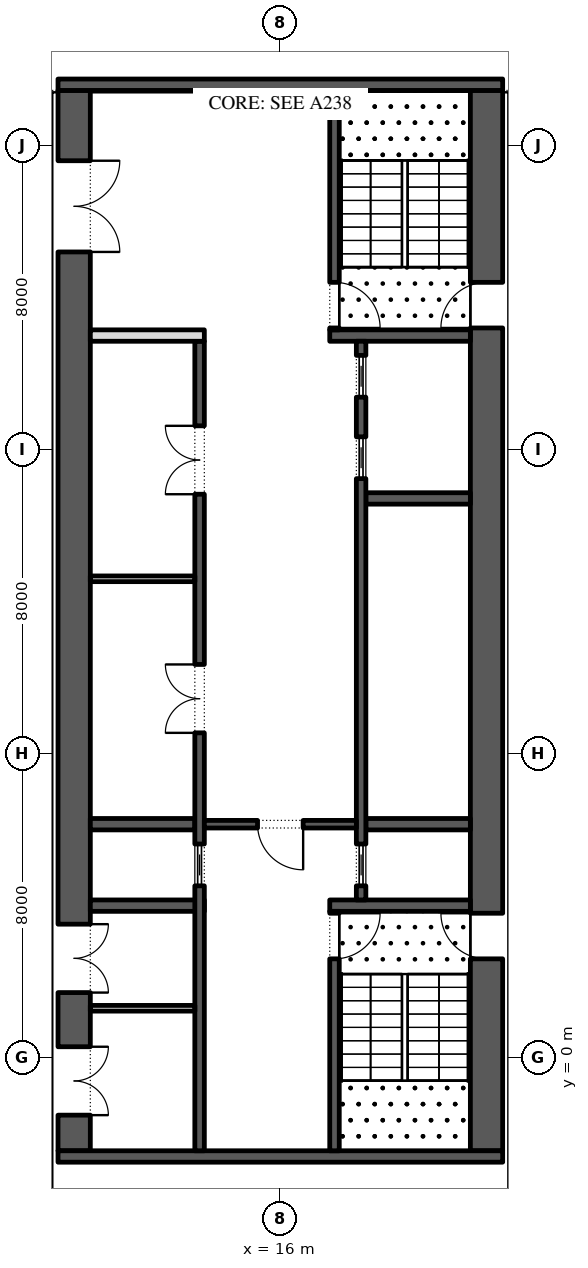
"""IFC4 building model, lengths in metres.
Left out: names, types, materials, properties, quantities, classifications, styles, units other than length and angle.
Written with IfcOpenShell. Run it as: python <this file> out.ifc"""

import sys

from ifc_helpers import new_model, si_unit, direction, frame, frame_2d, origin, place, context, subcontext, project, spatial, rectangle, extrude, element, fill, save


model = new_model("IFC4")
c1 = context("Model", 3, precision=1e-05, world=origin(), true_north=direction((0.0, 1.0)))
c2 = subcontext(c1, "Body", "Model", "MODEL_VIEW")
j1 = project(units=[si_unit("LENGTHUNIT", "METRE"), si_unit("PLANEANGLEUNIT", "RADIAN")], contexts=[c1])
p1 = place(None, origin())
s1 = spatial("IfcSite", under=j1, at=p1, CompositionType="ELEMENT")
p2 = place(p1, origin())
s2 = spatial("IfcBuilding", under=s1, at=p2, CompositionType="ELEMENT")
p3 = place(p2, frame((0.0, 0.0, 160.2)))
s3 = spatial("IfcBuildingStorey", under=s2, at=p3, CompositionType="ELEMENT", Elevation=160.2)
p4 = place(p3, frame((21.425, -2.45, 0.0), z_axis=(0.0, 0.0, 1.0), x_axis=(0.0, 1.0, 0.0)))
e1 = element("IfcWall", 1, at=p4, inside=s3, PredefinedType="SHEAR", context=c2, shape_type="SweptSolid", body=[
    extrude(rectangle(XDim=27.9, YDim=0.85, at=frame_2d((13.95, 0.0))), origin(), (0.0, 0.0, 1.0), 4.95),
])
p5 = place(p4, frame((5.05, 0.0, 0.0)))
e2 = element("IfcOpeningElement", 2, at=p5, cuts=e1, PredefinedType="OPENING", context=c2, shape_type="SweptSolid", body=[
    extrude(rectangle(XDim=1.2, YDim=2.1, at=frame_2d((0.6, 1.05))), frame((0.0, 0.435, 0.0), z_axis=(0.0, -1.0, 0.0), x_axis=(1.0, 0.0, 0.0)), (0.0, 0.0, 1.0), 0.87),
])
p6 = place(p4, frame((21.65, 0.0, 0.0)))
e3 = element("IfcOpeningElement", 3, at=p6, cuts=e1, PredefinedType="OPENING", context=c2, shape_type="SweptSolid", body=[
    extrude(rectangle(XDim=1.2, YDim=2.1, at=frame_2d((0.6, 1.05))), frame((0.0, 0.435, 0.0), z_axis=(0.0, -1.0, 0.0), x_axis=(1.0, 0.0, 0.0)), (0.0, 0.0, 1.0), 0.87),
])
p7 = place(p3, frame((10.575, -2.45, 0.0), z_axis=(0.0, 0.0, 1.0), x_axis=(0.0, 1.0, 0.0)))
e4 = element("IfcWall", 4, at=p7, inside=s3, PredefinedType="SHEAR", context=c2, shape_type="SweptSolid", body=[
    extrude(rectangle(XDim=27.9, YDim=0.85, at=frame_2d((13.95, 0.0))), origin(), (0.0, 0.0, 1.0), 4.95),
])
p8 = place(p7, frame((23.65, 0.0, 0.0)))
e5 = element("IfcOpeningElement", 5, at=p8, cuts=e4, PredefinedType="OPENING", context=c2, shape_type="SweptSolid", body=[
    extrude(rectangle(XDim=2.4, YDim=2.1, at=frame_2d((1.2, 1.05))), frame((0.0, 0.435, 0.0), z_axis=(0.0, -1.0, 0.0), x_axis=(1.0, 0.0, 0.0)), (0.0, 0.0, 1.0), 0.87),
])
p9 = place(p7, frame((0.938, 0.0, 0.0)))
e6 = element("IfcOpeningElement", 6, at=p9, cuts=e4, PredefinedType="OPENING", context=c2, shape_type="SweptSolid", body=[
    extrude(rectangle(XDim=1.8, YDim=2.4, at=frame_2d((0.9, 1.2))), frame((0.0, 0.435, 0.0), z_axis=(0.0, -1.0, 0.0), x_axis=(1.0, 0.0, 0.0)), (0.0, 0.0, 1.0), 0.87),
])
p10 = place(p7, frame((4.163, 0.0, 0.0)))
e7 = element("IfcOpeningElement", 7, at=p10, cuts=e4, PredefinedType="OPENING", context=c2, shape_type="SweptSolid", body=[
    extrude(rectangle(XDim=1.8, YDim=2.4, at=frame_2d((0.9, 1.2))), frame((0.0, 0.435, 0.0), z_axis=(0.0, -1.0, 0.0), x_axis=(1.0, 0.0, 0.0)), (0.0, 0.0, 1.0), 0.87),
])
for number, where, z_axis, x_axis in (
    (8, (10.15, -2.6, 0.0), (0.0, 0.0, 1.0), (1.0, 0.0, 0.0)),
    (9, (10.15, 25.6, 0.0), (0.0, 0.0, 1.0), (1.0, 0.0, 0.0)),
):
    element("IfcWall", number, at=place(p3, frame(where, z_axis=z_axis, x_axis=x_axis)), inside=s3, PredefinedType="SHEAR", context=c2, shape_type="SweptSolid", body=[
        extrude(rectangle(XDim=11.7, YDim=0.3, at=frame_2d((5.85, 0.0))), origin(), (0.0, 0.0, 1.0), 4.95),
    ])
p11 = place(p3, frame((17.3, 4.0, 0.0), z_axis=(0.0, 0.0, 1.0), x_axis=(1.0, 0.0, 0.0)))
e10 = element("IfcWall", 10, at=p11, inside=s3, PredefinedType="SHEAR", context=c2, shape_type="SweptSolid", body=[
    extrude(rectangle(XDim=3.7, YDim=0.3, at=frame_2d((1.85, 0.0))), origin(), (0.0, 0.0, 1.0), 4.95),
])
p12 = place(p3, frame((17.425, -2.45, 0.0), z_axis=(0.0, 0.0, 1.0), x_axis=(0.0, 1.0, 0.0)))
e11 = element("IfcWall", 11, at=p12, inside=s3, PredefinedType="SHEAR", context=c2, shape_type="SweptSolid", body=[
    extrude(rectangle(XDim=6.3, YDim=0.25, at=frame_2d((3.15, 0.0))), origin(), (0.0, 0.0, 1.0), 4.95),
])
p13 = place(p12, frame((5.05, 0.0, 0.0)))
e12 = element("IfcOpeningElement", 12, at=p13, cuts=e11, PredefinedType="OPENING", context=c2, shape_type="SweptSolid", body=[
    extrude(rectangle(XDim=1.2, YDim=2.1, at=frame_2d((0.6, 1.05))), frame((0.0, 0.135, 0.0), z_axis=(0.0, -1.0, 0.0), x_axis=(1.0, 0.0, 0.0)), (0.0, 0.0, 1.0), 0.27),
])
p14 = place(p3, frame((17.3, 19.0, 0.0), z_axis=(0.0, 0.0, 1.0), x_axis=(1.0, 0.0, 0.0)))
e13 = element("IfcWall", 13, at=p14, inside=s3, PredefinedType="SHEAR", context=c2, shape_type="SweptSolid", body=[
    extrude(rectangle(XDim=3.7, YDim=0.3, at=frame_2d((1.85, 0.0))), origin(), (0.0, 0.0, 1.0), 4.95),
])
p15 = place(p3, frame((17.425, 19.15, 0.0), z_axis=(0.0, 0.0, 1.0), x_axis=(0.0, 1.0, 0.0)))
e14 = element("IfcWall", 14, at=p15, inside=s3, PredefinedType="SHEAR", context=c2, shape_type="SweptSolid", body=[
    extrude(rectangle(XDim=6.3, YDim=0.25, at=frame_2d((3.15, 0.0))), origin(), (0.0, 0.0, 1.0), 4.95),
])
p16 = place(p15, frame((0.05, 0.0, 0.0)))
e15 = element("IfcOpeningElement", 15, at=p16, cuts=e14, PredefinedType="OPENING", context=c2, shape_type="SweptSolid", body=[
    extrude(rectangle(XDim=1.2, YDim=2.1, at=frame_2d((0.6, 1.05))), frame((0.0, 0.135, 0.0), z_axis=(0.0, -1.0, 0.0), x_axis=(1.0, 0.0, 0.0)), (0.0, 0.0, 1.0), 0.27),
])
for number, where, z_axis, x_axis in (
    (16, (18.25, 6.143, 0.0), (0.0, 0.0, 1.0), (1.0, 0.0, 0.0)),
    (17, (18.25, 14.714, 0.0), (0.0, 0.0, 1.0), (1.0, 0.0, 0.0)),
):
    element("IfcWall", number, at=place(p3, frame(where, z_axis=z_axis, x_axis=x_axis)), inside=s3, PredefinedType="SHEAR", context=c2, shape_type="SweptSolid", body=[
        extrude(rectangle(XDim=2.75, YDim=0.3, at=frame_2d((1.375, 0.0))), origin(), (0.0, 0.0, 1.0), 4.95),
    ])
p17 = place(p3, frame((18.125, 4.15, 0.0), z_axis=(0.0, 0.0, 1.0), x_axis=(0.0, 1.0, 0.0)))
e18 = element("IfcWall", 18, at=p17, inside=s3, PredefinedType="SHEAR", context=c2, shape_type="SweptSolid", body=[
    extrude(rectangle(XDim=14.7, YDim=0.25, at=frame_2d((7.35, 0.0))), origin(), (0.0, 0.0, 1.0), 4.95),
])
p18 = place(p17, frame((0.371, 0.0, 0.0)))
e19 = element("IfcOpeningElement", 19, at=p18, cuts=e18, PredefinedType="OPENING", context=c2, shape_type="SweptSolid", body=[
    extrude(rectangle(XDim=1.1, YDim=2.1, at=frame_2d((0.55, 1.05))), frame((0.0, 0.135, 0.0), z_axis=(0.0, -1.0, 0.0), x_axis=(1.0, 0.0, 0.0)), (0.0, 0.0, 1.0), 0.27),
])
p19 = place(p17, frame((11.086, 0.0, 0.0)))
e20 = element("IfcOpeningElement", 20, at=p19, cuts=e18, PredefinedType="OPENING", context=c2, shape_type="SweptSolid", body=[
    extrude(rectangle(XDim=1.1, YDim=2.1, at=frame_2d((0.55, 1.05))), frame((0.0, 0.135, 0.0), z_axis=(0.0, -1.0, 0.0), x_axis=(1.0, 0.0, 0.0)), (0.0, 0.0, 1.0), 0.27),
])
p20 = place(p17, frame((13.229, 0.0, 0.0)))
e21 = element("IfcOpeningElement", 21, at=p20, cuts=e18, PredefinedType="OPENING", context=c2, shape_type="SweptSolid", body=[
    extrude(rectangle(XDim=1.1, YDim=2.1, at=frame_2d((0.55, 1.05))), frame((0.0, 0.135, 0.0), z_axis=(0.0, -1.0, 0.0), x_axis=(1.0, 0.0, 0.0)), (0.0, 0.0, 1.0), 0.27),
])
p21 = place(p3, frame((11.0, 4.0, 0.0), z_axis=(0.0, 0.0, 1.0), x_axis=(1.0, 0.0, 0.0)))
e22 = element("IfcWall", 22, at=p21, inside=s3, PredefinedType="SHEAR", context=c2, shape_type="SweptSolid", body=[
    extrude(rectangle(XDim=3.0, YDim=0.3, at=frame_2d((1.5, 0.0))), origin(), (0.0, 0.0, 1.0), 4.95),
])
p22 = place(p3, frame((11.0, 6.143, 0.0), z_axis=(0.0, 0.0, 1.0), x_axis=(1.0, 0.0, 0.0)))
e23 = element("IfcWall", 23, at=p22, inside=s3, PredefinedType="SHEAR", context=c2, shape_type="SweptSolid", body=[
    extrude(rectangle(XDim=2.75, YDim=0.3, at=frame_2d((1.375, 0.0))), origin(), (0.0, 0.0, 1.0), 4.95),
])
p23 = place(p3, frame((13.875, -2.45, 0.0), z_axis=(0.0, 0.0, 1.0), x_axis=(0.0, 1.0, 0.0)))
e24 = element("IfcWall", 24, at=p23, inside=s3, PredefinedType="SHEAR", context=c2, shape_type="SweptSolid", body=[
    extrude(rectangle(XDim=21.3, YDim=0.25, at=frame_2d((10.65, 0.0))), origin(), (0.0, 0.0, 1.0), 4.95),
])
p24 = place(p23, frame((10.996, 0.0, 0.0)))
e25 = element("IfcOpeningElement", 25, at=p24, cuts=e24, PredefinedType="OPENING", context=c2, shape_type="SweptSolid", body=[
    extrude(rectangle(XDim=1.8, YDim=2.4, at=frame_2d((0.9, 1.2))), frame((0.0, 0.135, 0.0), z_axis=(0.0, -1.0, 0.0), x_axis=(1.0, 0.0, 0.0)), (0.0, 0.0, 1.0), 0.27),
])
p25 = place(p23, frame((17.275, 0.0, 0.0)))
e26 = element("IfcOpeningElement", 26, at=p25, cuts=e24, PredefinedType="OPENING", context=c2, shape_type="SweptSolid", body=[
    extrude(rectangle(XDim=1.8, YDim=2.4, at=frame_2d((0.9, 1.2))), frame((0.0, 0.135, 0.0), z_axis=(0.0, -1.0, 0.0), x_axis=(1.0, 0.0, 0.0)), (0.0, 0.0, 1.0), 0.27),
])
p26 = place(p23, frame((6.971, 0.0, 0.0)))
e27 = element("IfcOpeningElement", 27, at=p26, cuts=e24, PredefinedType="OPENING", context=c2, shape_type="SweptSolid", body=[
    extrude(rectangle(XDim=1.1, YDim=2.1, at=frame_2d((0.55, 1.05))), frame((0.0, 0.135, 0.0), z_axis=(0.0, -1.0, 0.0), x_axis=(1.0, 0.0, 0.0)), (0.0, 0.0, 1.0), 0.27),
])
p27 = place(p3, frame((11.0, 19.0, 0.0), z_axis=(0.0, 0.0, 1.0), x_axis=(1.0, 0.0, 0.0)))
e28 = element("IfcWall", 28, at=p27, inside=s3, PredefinedType="PARTITIONING", context=c2, shape_type="SweptSolid", body=[
    extrude(rectangle(XDim=3.0, YDim=0.3, at=frame_2d((1.5, 0.0))), origin(), (0.0, 0.0, 1.0), 4.95),
])
p28 = place(p3, frame((11.0, 12.6, 0.0), z_axis=(0.0, 0.0, 1.0), x_axis=(1.0, 0.0, 0.0)))
e29 = element("IfcWall", 29, at=p28, inside=s3, PredefinedType="PARTITIONING", context=c2, shape_type="SweptSolid", body=[
    extrude(rectangle(XDim=2.75, YDim=0.15, at=frame_2d((1.375, 0.0))), origin(), (0.0, 0.0, 1.0), 4.95),
])
p29 = place(p3, frame((14.0, 6.143, 0.0), z_axis=(0.0, 0.0, 1.0), x_axis=(1.0, 0.0, 0.0)))
e30 = element("IfcWall", 30, at=p29, inside=s3, PredefinedType="SHEAR", context=c2, shape_type="SweptSolid", body=[
    extrude(rectangle(XDim=4.0, YDim=0.2, at=frame_2d((2.0, 0.0))), origin(), (0.0, 0.0, 1.0), 4.95),
])
p30 = place(p29, frame((1.4, 0.0, 0.0)))
e31 = element("IfcOpeningElement", 31, at=p30, cuts=e30, PredefinedType="OPENING", context=c2, shape_type="SweptSolid", body=[
    extrude(rectangle(XDim=1.2, YDim=2.1, at=frame_2d((0.6, 1.05))), frame((0.0, 0.11, 0.0), z_axis=(0.0, -1.0, 0.0), x_axis=(1.0, 0.0, 0.0)), (0.0, 0.0, 1.0), 0.22),
])
p31 = place(p3, frame((11.0, 1.3, 0.0), z_axis=(0.0, 0.0, 1.0), x_axis=(1.0, 0.0, 0.0)))
e32 = element("IfcWall", 32, at=p31, inside=s3, PredefinedType="PARTITIONING", context=c2, shape_type="SweptSolid", body=[
    extrude(rectangle(XDim=2.75, YDim=0.15, at=frame_2d((1.375, 0.0))), origin(), (0.0, 0.0, 1.0), 4.95),
])
p32 = place(p18, origin())
e33 = element("IfcDoor", 33, at=p32, inside=s3, OperationType="SLIDING_TO_LEFT", PredefinedType="DOOR", context=c2, shape_type="SweptSolid", body=[
    extrude(rectangle(XDim=1.1, YDim=2.1, at=frame_2d((0.55, 1.05))), frame((0.0, 0.025, 0.0), z_axis=(0.0, -1.0, 0.0), x_axis=(1.0, 0.0, 0.0)), (0.0, 0.0, 1.0), 0.05),
])
fill(e19, e33)
p33 = place(p19, origin())
e34 = element("IfcDoor", 34, at=p33, inside=s3, OperationType="SLIDING_TO_LEFT", PredefinedType="DOOR", context=c2, shape_type="SweptSolid", body=[
    extrude(rectangle(XDim=1.1, YDim=2.1, at=frame_2d((0.55, 1.05))), frame((0.0, 0.025, 0.0), z_axis=(0.0, -1.0, 0.0), x_axis=(1.0, 0.0, 0.0)), (0.0, 0.0, 1.0), 0.05),
])
fill(e20, e34)
p34 = place(p20, origin())
e35 = element("IfcDoor", 35, at=p34, inside=s3, OperationType="SLIDING_TO_LEFT", PredefinedType="DOOR", context=c2, shape_type="SweptSolid", body=[
    extrude(rectangle(XDim=1.1, YDim=2.1, at=frame_2d((0.55, 1.05))), frame((0.0, 0.025, 0.0), z_axis=(0.0, -1.0, 0.0), x_axis=(1.0, 0.0, 0.0)), (0.0, 0.0, 1.0), 0.05),
])
fill(e21, e35)
p35 = place(p24, origin())
e36 = element("IfcDoor", 36, at=p35, inside=s3, OperationType="DOUBLE_DOOR_SINGLE_SWING", PredefinedType="DOOR", context=c2, shape_type="SweptSolid", body=[
    extrude(rectangle(XDim=1.8, YDim=2.4, at=frame_2d((0.9, 1.2))), frame((0.0, 0.125, 0.0), z_axis=(0.0, -1.0, 0.0), x_axis=(1.0, 0.0, 0.0)), (0.0, 0.0, 1.0), 0.05),
])
fill(e25, e36)
p36 = place(p25, origin())
e37 = element("IfcDoor", 37, at=p36, inside=s3, OperationType="DOUBLE_DOOR_SINGLE_SWING", PredefinedType="DOOR", context=c2, shape_type="SweptSolid", body=[
    extrude(rectangle(XDim=1.8, YDim=2.4, at=frame_2d((0.9, 1.2))), frame((0.0, 0.125, 0.0), z_axis=(0.0, -1.0, 0.0), x_axis=(1.0, 0.0, 0.0)), (0.0, 0.0, 1.0), 0.05),
])
fill(e26, e37)
p37 = place(p26, origin())
e38 = element("IfcDoor", 38, at=p37, inside=s3, OperationType="SLIDING_TO_LEFT", PredefinedType="DOOR", context=c2, shape_type="SweptSolid", body=[
    extrude(rectangle(XDim=1.1, YDim=2.1, at=frame_2d((0.55, 1.05))), frame((0.0, 0.025, 0.0), z_axis=(0.0, -1.0, 0.0), x_axis=(1.0, 0.0, 0.0)), (0.0, 0.0, 1.0), 0.05),
])
fill(e27, e38)
p38 = place(p30, frame((1.2, 0.0, 0.0), z_axis=(0.0, 0.0, 1.0), x_axis=(-1.0, 0.0, 0.0)))
e39 = element("IfcDoor", 39, at=p38, inside=s3, OperationType="SINGLE_SWING_RIGHT", PredefinedType="DOOR", context=c2, shape_type="SweptSolid", body=[
    extrude(rectangle(XDim=1.2, YDim=2.1, at=frame_2d((0.6, 1.05))), frame((0.0, 0.025, 0.0), z_axis=(0.0, -1.0, 0.0), x_axis=(1.0, 0.0, 0.0)), (0.0, 0.0, 1.0), 0.05),
])
fill(e31, e39)
p39 = place(p8, frame((2.4, 0.0, 0.0), z_axis=(0.0, 0.0, 1.0), x_axis=(-1.0, 0.0, 0.0)))
e40 = element("IfcDoor", 40, at=p39, inside=s3, OperationType="DOUBLE_DOOR_SINGLE_SWING", PredefinedType="DOOR", context=c2, shape_type="SweptSolid", body=[
    extrude(rectangle(XDim=2.4, YDim=2.1, at=frame_2d((1.2, 1.05))), frame((0.0, 0.025, 0.0), z_axis=(0.0, -1.0, 0.0), x_axis=(1.0, 0.0, 0.0)), (0.0, 0.0, 1.0), 0.05),
])
fill(e5, e40)
p40 = place(p13, frame((1.2, 0.0, 0.0), z_axis=(0.0, 0.0, 1.0), x_axis=(-1.0, 0.0, 0.0)))
e41 = element("IfcDoor", 41, at=p40, inside=s3, OperationType="SINGLE_SWING_RIGHT", PredefinedType="DOOR", context=c2, shape_type="SweptSolid", body=[
    extrude(rectangle(XDim=1.2, YDim=2.1, at=frame_2d((0.6, 1.05))), frame((0.0, 0.025, 0.0), z_axis=(0.0, -1.0, 0.0), x_axis=(1.0, 0.0, 0.0)), (0.0, 0.0, 1.0), 0.05),
])
fill(e12, e41)
p41 = place(p5, origin())
e42 = element("IfcDoor", 42, at=p41, inside=s3, OperationType="SINGLE_SWING_LEFT", PredefinedType="DOOR", context=c2, shape_type="SweptSolid", body=[
    extrude(rectangle(XDim=1.2, YDim=2.1, at=frame_2d((0.6, 1.05))), frame((0.0, 0.025, 0.0), z_axis=(0.0, -1.0, 0.0), x_axis=(1.0, 0.0, 0.0)), (0.0, 0.0, 1.0), 0.05),
])
fill(e2, e42)
p42 = place(p16, frame((1.2, 0.0, 0.0), z_axis=(0.0, 0.0, 1.0), x_axis=(-1.0, 0.0, 0.0)))
e43 = element("IfcDoor", 43, at=p42, inside=s3, OperationType="SINGLE_SWING_LEFT", PredefinedType="DOOR", context=c2, shape_type="SweptSolid", body=[
    extrude(rectangle(XDim=1.2, YDim=2.1, at=frame_2d((0.6, 1.05))), frame((0.0, 0.025, 0.0), z_axis=(0.0, -1.0, 0.0), x_axis=(1.0, 0.0, 0.0)), (0.0, 0.0, 1.0), 0.05),
])
fill(e15, e43)
p43 = place(p6, origin())
e44 = element("IfcDoor", 44, at=p43, inside=s3, OperationType="SINGLE_SWING_RIGHT", PredefinedType="DOOR", context=c2, shape_type="SweptSolid", body=[
    extrude(rectangle(XDim=1.2, YDim=2.1, at=frame_2d((0.6, 1.05))), frame((0.0, 0.025, 0.0), z_axis=(0.0, -1.0, 0.0), x_axis=(1.0, 0.0, 0.0)), (0.0, 0.0, 1.0), 0.05),
])
fill(e3, e44)
p44 = place(p9, frame((1.8, -0.8, 0.0), z_axis=(0.0, 0.0, 1.0), x_axis=(-1.0, 0.0, 0.0)))
e45 = element("IfcDoor", 45, at=p44, inside=s3, OperationType="DOUBLE_DOOR_SINGLE_SWING", PredefinedType="DOOR", context=c2, shape_type="SweptSolid", body=[
    extrude(rectangle(XDim=1.8, YDim=2.4, at=frame_2d((0.9, 1.2))), frame((0.0, -0.375, 0.0), z_axis=(0.0, -1.0, 0.0), x_axis=(1.0, 0.0, 0.0)), (0.0, 0.0, 1.0), 0.05),
])
fill(e6, e45)
p45 = place(p10, frame((1.8, -0.8, 0.0), z_axis=(0.0, 0.0, 1.0), x_axis=(-1.0, 0.0, 0.0)))
e46 = element("IfcDoor", 46, at=p45, inside=s3, OperationType="DOUBLE_DOOR_SINGLE_SWING", PredefinedType="DOOR", context=c2, shape_type="SweptSolid", body=[
    extrude(rectangle(XDim=1.8, YDim=2.4, at=frame_2d((0.9, 1.2))), frame((0.0, -0.375, 0.0), z_axis=(0.0, -1.0, 0.0), x_axis=(1.0, 0.0, 0.0)), (0.0, 0.0, 1.0), 0.05),
])
fill(e7, e46)
save(model, sys.argv[1])
